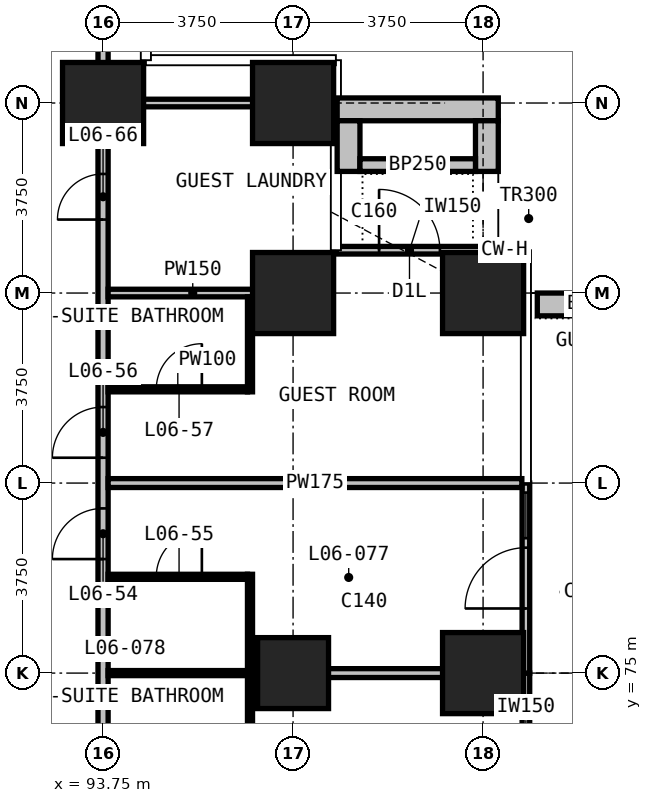
"""IFC4 building model, lengths in metres.
Left out: names, types, materials, properties, quantities, classifications, styles, units other than length and angle.
Written with IfcOpenShell. Run it as: python <this file> out.ifc"""

import sys

from ifc_helpers import new_model, si_unit, direction, frame, frame_2d, origin, origin_2d, place, context, subcontext, project, spatial, rectangle, extrude, element, fill, save


model = new_model("IFC4")
c1 = context("Model", 3, precision=1e-05, world=origin(), true_north=direction((0.0, 1.0)))
c2 = subcontext(c1, "Body", "Model", "MODEL_VIEW")
j1 = project(units=[si_unit("LENGTHUNIT", "METRE"), si_unit("PLANEANGLEUNIT", "RADIAN")], contexts=[c1])
p1 = place(None, origin())
s1 = spatial("IfcSite", under=j1, at=p1, CompositionType="ELEMENT")
p2 = place(p1, origin())
s2 = spatial("IfcBuilding", under=s1, at=p2, CompositionType="ELEMENT")
p3 = place(p2, frame((0.0, 0.0, 39.5)))
s3 = spatial("IfcBuildingStorey", under=s2, at=p3, CompositionType="ELEMENT", Elevation=39.5)
p4 = place(p3, frame((93.75, 86.25, 0.0), z_axis=(0.0, 0.0, 1.0), x_axis=(1.0, 0.0, 0.0)))
e1 = element("IfcColumn", 1, at=p4, inside=s3, PredefinedType="COLUMN", context=c2, shape_type="SweptSolid", body=[
    extrude(rectangle(XDim=1.6, YDim=1.6, at=origin_2d()), origin(), (0.0, 0.0, 1.0), 3.3),
])
p5 = place(p3, frame((97.5, 75.0, 0.0), z_axis=(0.0, 0.0, 1.0), x_axis=(1.0, 0.0, 0.0)))
e2 = element("IfcColumn", 2, at=p5, inside=s3, PredefinedType="COLUMN", context=c2, shape_type="SweptSolid", body=[
    extrude(rectangle(XDim=1.4, YDim=1.4, at=origin_2d()), origin(), (0.0, 0.0, 1.0), 3.3),
])
for number, where, z_axis, x_axis in (
    (3, (97.5, 82.5, 0.0), (0.0, 0.0, 1.0), (1.0, 0.0, 0.0)),
    (4, (97.5, 86.25, 0.0), (0.0, 0.0, 1.0), (1.0, 0.0, 0.0)),
    (5, (101.25, 75.0, 0.0), (0.0, 0.0, 1.0), (1.0, 0.0, 0.0)),
    (6, (101.25, 82.5, 0.0), (0.0, 0.0, 1.0), (1.0, 0.0, 0.0)),
):
    element("IfcColumn", number, at=place(p3, frame(where, z_axis=z_axis, x_axis=x_axis)), inside=s3, PredefinedType="COLUMN", context=c2, shape_type="SweptSolid", body=[
        extrude(rectangle(XDim=1.6, YDim=1.6, at=origin_2d()), origin(), (0.0, 0.0, 1.0), 3.3),
    ])
p6 = place(p3, frame((102.095, 71.25, 0.0), z_axis=(0.0, 0.0, 1.0), x_axis=(0.0, 1.0, 0.0)))
e7 = element("IfcWall", 7, at=p6, inside=s3, PredefinedType="SOLIDWALL", context=c2, shape_type="SweptSolid", body=[
    extrude(rectangle(XDim=3.75, YDim=0.15, at=frame_2d((1.875, 0.0))), origin(), (0.0, 0.0, 1.0), 3.0),
])
p7 = place(p6, frame((0.188, 0.0, 0.1)))
e8 = element("IfcOpeningElement", 8, at=p7, cuts=e7, PredefinedType="OPENING", context=c2, shape_type="SweptSolid", body=[
    extrude(rectangle(XDim=0.9, YDim=2.4, at=frame_2d((0.45, 1.2))), frame((0.0, 0.085, 0.0), z_axis=(0.0, -1.0, 0.0), x_axis=(1.0, 0.0, 0.0)), (0.0, 0.0, 1.0), 0.17),
])
p8 = place(p6, frame((1.275, 0.0, 0.0)))
e9 = element("IfcOpeningElement", 9, at=p8, cuts=e7, PredefinedType="OPENING", context=c2, shape_type="SweptSolid", body=[
    extrude(rectangle(XDim=1.2, YDim=2.4, at=frame_2d((0.6, 1.2))), frame((0.0, 0.085, 0.0), z_axis=(0.0, -1.0, 0.0), x_axis=(1.0, 0.0, 0.0)), (0.0, 0.0, 1.0), 0.17),
])
p9 = place(p3, frame((102.095, 75.0, 0.0), z_axis=(0.0, 0.0, 1.0), x_axis=(0.0, 1.0, 0.0)))
e10 = element("IfcWall", 10, at=p9, inside=s3, PredefinedType="SOLIDWALL", context=c2, shape_type="SweptSolid", body=[
    extrude(rectangle(XDim=3.75, YDim=0.15, at=frame_2d((1.875, 0.0))), origin(), (0.0, 0.0, 1.0), 3.0),
])
p10 = place(p9, frame((1.275, 0.0, 0.0)))
e11 = element("IfcOpeningElement", 11, at=p10, cuts=e10, PredefinedType="OPENING", context=c2, shape_type="SweptSolid", body=[
    extrude(rectangle(XDim=1.2, YDim=2.4, at=frame_2d((0.6, 1.2))), frame((0.0, 0.085, 0.0), z_axis=(0.0, -1.0, 0.0), x_axis=(1.0, 0.0, 0.0)), (0.0, 0.0, 1.0), 0.17),
])
p11 = place(p9, frame((2.663, 0.0, 0.1)))
e12 = element("IfcOpeningElement", 12, at=p11, cuts=e10, PredefinedType="OPENING", context=c2, shape_type="SweptSolid", body=[
    extrude(rectangle(XDim=0.9, YDim=2.4, at=frame_2d((0.45, 1.2))), frame((0.0, 0.085, 0.0), z_axis=(0.0, -1.0, 0.0), x_axis=(1.0, 0.0, 0.0)), (0.0, 0.0, 1.0), 0.17),
])
p12 = place(p3, frame((98.345, 83.345, 0.0), z_axis=(0.0, 0.0, 1.0), x_axis=(1.0, 0.0, 0.0)))
e13 = element("IfcWall", 13, at=p12, inside=s3, PredefinedType="SOLIDWALL", context=c2, shape_type="SweptSolid", body=[
    extrude(rectangle(XDim=2.905, YDim=0.15, at=frame_2d((1.453, 0.0))), origin(), (0.0, 0.0, 1.0), 3.0),
])
p13 = place(p12, frame((0.853, 0.0, 0.0)))
e14 = element("IfcOpeningElement", 14, at=p13, cuts=e13, PredefinedType="OPENING", context=c2, shape_type="SweptSolid", body=[
    extrude(rectangle(XDim=1.2, YDim=2.0, at=frame_2d((0.6, 1.0))), frame((0.0, 0.085, 0.0), z_axis=(0.0, -1.0, 0.0), x_axis=(1.0, 0.0, 0.0)), (0.0, 0.0, 1.0), 0.17),
])
p14 = place(p3, frame((102.32, 82.275, 0.0), z_axis=(0.0, 0.0, 1.0), x_axis=(1.0, 0.0, 0.0)))
e15 = element("IfcWall", 15, at=p14, inside=s3, PredefinedType="USERDEFINED", context=c2, shape_type="SweptSolid", body=[
    extrude(rectangle(XDim=2.33, YDim=0.45, at=frame_2d((1.165, 0.0))), origin(), (0.0, 0.0, 1.0), 1.1),
])
p15 = place(p3, frame((98.37, 86.125, 0.0), z_axis=(0.0, 0.0, 1.0), x_axis=(1.0, 0.0, 0.0)))
e16 = element("IfcWall", 16, at=p15, inside=s3, PredefinedType="USERDEFINED", context=c2, shape_type="SweptSolid", body=[
    extrude(rectangle(XDim=3.18, YDim=0.45, at=frame_2d((1.59, 0.0))), origin(), (0.0, 0.0, 1.0), 1.1),
])
for number, where, z_axis, x_axis in (
    (17, (98.595, 84.9, 0.0), (0.0, 0.0, 1.0), (0.0, 1.0, 0.0)),
    (18, (101.325, 84.9, 0.0), (0.0, 0.0, 1.0), (0.0, 1.0, 0.0)),
):
    element("IfcWall", number, at=place(p3, frame(where, z_axis=z_axis, x_axis=x_axis)), inside=s3, PredefinedType="USERDEFINED", context=c2, shape_type="SweptSolid", body=[
        extrude(rectangle(XDim=1.0, YDim=0.45, at=frame_2d((0.5, 0.0))), origin(), (0.0, 0.0, 1.0), 1.1),
    ])
p16 = place(p3, frame((98.82, 85.025, 0.0), z_axis=(0.0, 0.0, 1.0), x_axis=(1.0, 0.0, 0.0)))
e19 = element("IfcWall", 19, at=p16, inside=s3, PredefinedType="USERDEFINED", context=c2, shape_type="SweptSolid", body=[
    extrude(rectangle(XDim=2.28, YDim=0.25, at=frame_2d((1.14, 0.0))), origin(), (0.0, 0.0, 1.0), 1.0),
])
p17 = place(p3, frame((93.75, 52.4, 0.0), z_axis=(0.0, 0.0, 1.0), x_axis=(0.0, 1.0, 0.0)))
e20 = element("IfcWall", 20, at=p17, inside=s3, PredefinedType="PARTITIONING", context=c2, shape_type="SweptSolid", body=[
    extrude(rectangle(XDim=33.925, YDim=0.2, at=frame_2d((16.962, 0.0))), origin(), (0.0, 0.0, 1.0), 3.0),
])
p18 = place(p17, frame((2.35, 0.0, 0.0)))
e21 = element("IfcOpeningElement", 21, at=p18, cuts=e20, PredefinedType="OPENING", context=c2, shape_type="SweptSolid", body=[
    extrude(rectangle(XDim=1.0, YDim=2.2, at=frame_2d((0.5, 1.1))), frame((0.0, 0.11, 0.0), z_axis=(0.0, -1.0, 0.0), x_axis=(1.0, 0.0, 0.0)), (0.0, 0.0, 1.0), 0.22),
])
p19 = place(p17, frame((4.35, 0.0, 0.0)))
e22 = element("IfcOpeningElement", 22, at=p19, cuts=e20, PredefinedType="OPENING", context=c2, shape_type="SweptSolid", body=[
    extrude(rectangle(XDim=1.0, YDim=2.2, at=frame_2d((0.5, 1.1))), frame((0.0, 0.11, 0.0), z_axis=(0.0, -1.0, 0.0), x_axis=(1.0, 0.0, 0.0)), (0.0, 0.0, 1.0), 0.22),
])
p20 = place(p17, frame((9.85, 0.0, 0.0)))
e23 = element("IfcOpeningElement", 23, at=p20, cuts=e20, PredefinedType="OPENING", context=c2, shape_type="SweptSolid", body=[
    extrude(rectangle(XDim=1.0, YDim=2.2, at=frame_2d((0.5, 1.1))), frame((0.0, 0.11, 0.0), z_axis=(0.0, -1.0, 0.0), x_axis=(1.0, 0.0, 0.0)), (0.0, 0.0, 1.0), 0.22),
])
p21 = place(p17, frame((11.85, 0.0, 0.0)))
e24 = element("IfcOpeningElement", 24, at=p21, cuts=e20, PredefinedType="OPENING", context=c2, shape_type="SweptSolid", body=[
    extrude(rectangle(XDim=1.0, YDim=2.2, at=frame_2d((0.5, 1.1))), frame((0.0, 0.11, 0.0), z_axis=(0.0, -1.0, 0.0), x_axis=(1.0, 0.0, 0.0)), (0.0, 0.0, 1.0), 0.22),
])
p22 = place(p17, frame((17.35, 0.0, 0.0)))
e25 = element("IfcOpeningElement", 25, at=p22, cuts=e20, PredefinedType="OPENING", context=c2, shape_type="SweptSolid", body=[
    extrude(rectangle(XDim=1.0, YDim=2.2, at=frame_2d((0.5, 1.1))), frame((0.0, 0.11, 0.0), z_axis=(0.0, -1.0, 0.0), x_axis=(1.0, 0.0, 0.0)), (0.0, 0.0, 1.0), 0.22),
])
p23 = place(p17, frame((19.35, 0.0, 0.0)))
e26 = element("IfcOpeningElement", 26, at=p23, cuts=e20, PredefinedType="OPENING", context=c2, shape_type="SweptSolid", body=[
    extrude(rectangle(XDim=1.0, YDim=2.2, at=frame_2d((0.5, 1.1))), frame((0.0, 0.11, 0.0), z_axis=(0.0, -1.0, 0.0), x_axis=(1.0, 0.0, 0.0)), (0.0, 0.0, 1.0), 0.22),
])
p24 = place(p17, frame((24.85, 0.0, 0.0)))
e27 = element("IfcOpeningElement", 27, at=p24, cuts=e20, PredefinedType="OPENING", context=c2, shape_type="SweptSolid", body=[
    extrude(rectangle(XDim=1.0, YDim=2.2, at=frame_2d((0.5, 1.1))), frame((0.0, 0.11, 0.0), z_axis=(0.0, -1.0, 0.0), x_axis=(1.0, 0.0, 0.0)), (0.0, 0.0, 1.0), 0.22),
])
p25 = place(p17, frame((26.85, 0.0, 0.0)))
e28 = element("IfcOpeningElement", 28, at=p25, cuts=e20, PredefinedType="OPENING", context=c2, shape_type="SweptSolid", body=[
    extrude(rectangle(XDim=1.0, YDim=2.2, at=frame_2d((0.5, 1.1))), frame((0.0, 0.11, 0.0), z_axis=(0.0, -1.0, 0.0), x_axis=(1.0, 0.0, 0.0)), (0.0, 0.0, 1.0), 0.22),
])
p26 = place(p17, frame((31.55, 0.0, 0.0)))
e29 = element("IfcOpeningElement", 29, at=p26, cuts=e20, PredefinedType="OPENING", context=c2, shape_type="SweptSolid", body=[
    extrude(rectangle(XDim=0.9, YDim=2.2, at=frame_2d((0.45, 1.1))), frame((0.0, 0.11, 0.0), z_axis=(0.0, -1.0, 0.0), x_axis=(1.0, 0.0, 0.0)), (0.0, 0.0, 1.0), 0.22),
])
p27 = place(p3, frame((93.75, 86.28, 0.0), z_axis=(0.0, 0.0, 1.0), x_axis=(0.0, 1.0, 0.0)))
e30 = element("IfcWall", 30, at=p27, inside=s3, PredefinedType="PARTITIONING", context=c2, shape_type="SweptSolid", body=[
    extrude(rectangle(XDim=4.365, YDim=0.2, at=frame_2d((2.183, 0.0))), origin(), (0.0, 0.0, 1.0), 3.0),
])
p28 = place(p3, frame((96.7, 75.0, 0.0), z_axis=(0.0, 0.0, 1.0), x_axis=(1.0, 0.0, 0.0)))
e31 = element("IfcWall", 31, at=p28, inside=s3, PredefinedType="PARTITIONING", context=c2, shape_type="SweptSolid", body=[
    extrude(rectangle(XDim=5.315, YDim=0.175, at=frame_2d((2.657, 0.0))), origin(), (0.0, 0.0, 1.0), 3.0),
])
p29 = place(p3, frame((93.85, 78.75, 0.0), z_axis=(0.0, 0.0, 1.0), x_axis=(1.0, 0.0, 0.0)))
e32 = element("IfcWall", 32, at=p29, inside=s3, PredefinedType="PARTITIONING", context=c2, shape_type="SweptSolid", body=[
    extrude(rectangle(XDim=8.165, YDim=0.175, at=frame_2d((4.083, 0.0))), origin(), (0.0, 0.0, 1.0), 3.0),
])
p30 = place(p3, frame((93.85, 82.5, 0.0), z_axis=(0.0, 0.0, 1.0), x_axis=(1.0, 0.0, 0.0)))
e33 = element("IfcWall", 33, at=p30, inside=s3, PredefinedType="PARTITIONING", context=c2, shape_type="SweptSolid", body=[
    extrude(rectangle(XDim=3.34, YDim=0.15, at=frame_2d((1.67, 0.0))), origin(), (0.0, 0.0, 1.0), 3.0),
])
p31 = place(p3, frame((93.85, 86.25, 0.0), z_axis=(0.0, 0.0, 1.0), x_axis=(1.0, 0.0, 0.0)))
e34 = element("IfcWall", 34, at=p31, inside=s3, PredefinedType="PARTITIONING", context=c2, shape_type="SweptSolid", body=[
    extrude(rectangle(XDim=4.295, YDim=0.15, at=frame_2d((2.147, 0.0))), origin(), (0.0, 0.0, 1.0), 3.0),
])
p32 = place(p3, frame((97.265, 82.425, 0.0), z_axis=(0.0, 0.0, 1.0), x_axis=(0.0, 1.0, 0.0)))
e35 = element("IfcWall", 35, at=p32, inside=s3, PredefinedType="PARTITIONING", context=c2, shape_type="SweptSolid", body=[
    extrude(rectangle(XDim=0.84, YDim=0.15, at=frame_2d((0.42, 0.0))), origin(), (0.0, 0.0, 1.0), 3.0),
])
p33 = place(p3, frame((93.85, 75.0, 0.0), z_axis=(0.0, 0.0, 1.0), x_axis=(1.0, 0.0, 0.0)))
e36 = element("IfcWall", 36, at=p33, inside=s3, PredefinedType="PARTITIONING", context=c2, shape_type="SweptSolid", body=[
    extrude(rectangle(XDim=2.75, YDim=0.1, at=frame_2d((1.375, 0.0))), origin(), (0.0, 0.0, 1.0), 3.0),
])
p34 = place(p3, frame((93.85, 76.9, 0.0), z_axis=(0.0, 0.0, 1.0), x_axis=(1.0, 0.0, 0.0)))
e37 = element("IfcWall", 37, at=p34, inside=s3, PredefinedType="PARTITIONING", context=c2, shape_type="SweptSolid", body=[
    extrude(rectangle(XDim=2.75, YDim=0.1, at=frame_2d((1.375, 0.0))), origin(), (0.0, 0.0, 1.0), 3.0),
])
p35 = place(p34, frame((0.95, 0.0, 0.0)))
e38 = element("IfcOpeningElement", 38, at=p35, cuts=e37, PredefinedType="OPENING", context=c2, shape_type="SweptSolid", body=[
    extrude(rectangle(XDim=0.9, YDim=2.2, at=frame_2d((0.45, 1.1))), frame((0.0, 0.06, 0.0), z_axis=(0.0, -1.0, 0.0), x_axis=(1.0, 0.0, 0.0)), (0.0, 0.0, 1.0), 0.12),
])
p36 = place(p3, frame((93.85, 80.6, 0.0), z_axis=(0.0, 0.0, 1.0), x_axis=(1.0, 0.0, 0.0)))
e39 = element("IfcWall", 39, at=p36, inside=s3, PredefinedType="PARTITIONING", context=c2, shape_type="SweptSolid", body=[
    extrude(rectangle(XDim=2.75, YDim=0.1, at=frame_2d((1.375, 0.0))), origin(), (0.0, 0.0, 1.0), 3.0),
])
p37 = place(p36, frame((0.95, 0.0, 0.0)))
e40 = element("IfcOpeningElement", 40, at=p37, cuts=e39, PredefinedType="OPENING", context=c2, shape_type="SweptSolid", body=[
    extrude(rectangle(XDim=0.9, YDim=2.2, at=frame_2d((0.45, 1.1))), frame((0.0, 0.06, 0.0), z_axis=(0.0, -1.0, 0.0), x_axis=(1.0, 0.0, 0.0)), (0.0, 0.0, 1.0), 0.12),
])
p38 = place(p3, frame((96.65, 73.05, 0.0), z_axis=(0.0, 0.0, 1.0), x_axis=(0.0, 1.0, 0.0)))
e41 = element("IfcWall", 41, at=p38, inside=s3, PredefinedType="PARTITIONING", context=c2, shape_type="SweptSolid", body=[
    extrude(rectangle(XDim=3.9, YDim=0.1, at=frame_2d((1.95, 0.0))), origin(), (0.0, 0.0, 1.0), 3.0),
])
p39 = place(p3, frame((96.65, 80.55, 0.0), z_axis=(0.0, 0.0, 1.0), x_axis=(0.0, 1.0, 0.0)))
e42 = element("IfcWall", 42, at=p39, inside=s3, PredefinedType="PARTITIONING", context=c2, shape_type="SweptSolid", body=[
    extrude(rectangle(XDim=1.875, YDim=0.1, at=frame_2d((0.938, 0.0))), origin(), (0.0, 0.0, 1.0), 3.0),
])
p40 = place(p10, origin())
e43 = element("IfcDoor", 43, at=p40, inside=s3, OperationType="SINGLE_SWING_LEFT", PredefinedType="DOOR", context=c2, shape_type="SweptSolid", body=[
    extrude(rectangle(XDim=1.2, YDim=2.4, at=frame_2d((0.6, 1.2))), frame((0.0, 0.025, 0.0), z_axis=(0.0, -1.0, 0.0), x_axis=(1.0, 0.0, 0.0)), (0.0, 0.0, 1.0), 0.05),
])
fill(e11, e43)
p41 = place(p11, origin())
e44 = element("IfcWindow", 44, at=p41, inside=s3, PartitioningType="SINGLE_PANEL", PredefinedType="WINDOW", context=c2, shape_type="SweptSolid", body=[
    extrude(rectangle(XDim=0.9, YDim=2.4, at=frame_2d((0.45, 1.2))), frame((0.0, 0.03, 0.0), z_axis=(0.0, -1.0, 0.0), x_axis=(1.0, 0.0, 0.0)), (0.0, 0.0, 1.0), 0.06),
])
fill(e12, e44)
p42 = place(p13, origin())
e45 = element("IfcDoor", 45, at=p42, inside=s3, OperationType="SINGLE_SWING_LEFT", PredefinedType="DOOR", context=c2, shape_type="SweptSolid", body=[
    extrude(rectangle(XDim=1.2, YDim=2.0, at=frame_2d((0.6, 1.0))), frame((0.0, 0.025, 0.0), z_axis=(0.0, -1.0, 0.0), x_axis=(1.0, 0.0, 0.0)), (0.0, 0.0, 1.0), 0.05),
])
fill(e14, e45)
p43 = place(p24, origin())
e46 = element("IfcDoor", 46, at=p43, inside=s3, OperationType="SINGLE_SWING_LEFT", PredefinedType="DOOR", context=c2, shape_type="SweptSolid", body=[
    extrude(rectangle(XDim=1.0, YDim=2.2, at=frame_2d((0.5, 1.1))), frame((0.0, 0.025, 0.0), z_axis=(0.0, -1.0, 0.0), x_axis=(1.0, 0.0, 0.0)), (0.0, 0.0, 1.0), 0.05),
])
fill(e27, e46)
p44 = place(p35, origin())
e47 = element("IfcDoor", 47, at=p44, inside=s3, OperationType="SINGLE_SWING_RIGHT", PredefinedType="DOOR", context=c2, shape_type="SweptSolid", body=[
    extrude(rectangle(XDim=0.9, YDim=2.2, at=frame_2d((0.45, 1.1))), frame((0.0, 0.025, 0.0), z_axis=(0.0, -1.0, 0.0), x_axis=(1.0, 0.0, 0.0)), (0.0, 0.0, 1.0), 0.05),
])
fill(e38, e47)
p45 = place(p25, origin())
e48 = element("IfcDoor", 48, at=p45, inside=s3, OperationType="SINGLE_SWING_LEFT", PredefinedType="DOOR", context=c2, shape_type="SweptSolid", body=[
    extrude(rectangle(XDim=1.0, YDim=2.2, at=frame_2d((0.5, 1.1))), frame((0.0, 0.025, 0.0), z_axis=(0.0, -1.0, 0.0), x_axis=(1.0, 0.0, 0.0)), (0.0, 0.0, 1.0), 0.05),
])
fill(e28, e48)
p46 = place(p37, origin())
e49 = element("IfcDoor", 49, at=p46, inside=s3, OperationType="SINGLE_SWING_RIGHT", PredefinedType="DOOR", context=c2, shape_type="SweptSolid", body=[
    extrude(rectangle(XDim=0.9, YDim=2.2, at=frame_2d((0.45, 1.1))), frame((0.0, 0.025, 0.0), z_axis=(0.0, -1.0, 0.0), x_axis=(1.0, 0.0, 0.0)), (0.0, 0.0, 1.0), 0.05),
])
fill(e40, e49)
p47 = place(p26, origin())
e50 = element("IfcDoor", 50, at=p47, inside=s3, OperationType="SINGLE_SWING_RIGHT", PredefinedType="DOOR", context=c2, shape_type="SweptSolid", body=[
    extrude(rectangle(XDim=0.9, YDim=2.2, at=frame_2d((0.45, 1.1))), frame((0.0, 0.025, 0.0), z_axis=(0.0, -1.0, 0.0), x_axis=(1.0, 0.0, 0.0)), (0.0, 0.0, 1.0), 0.05),
])
fill(e29, e50)
save(model, sys.argv[1])
